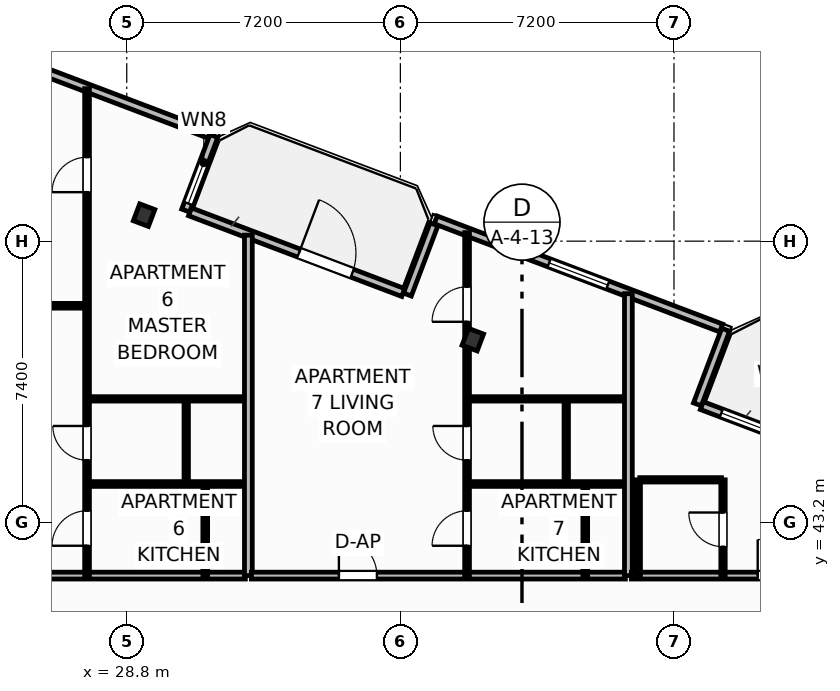
"""IFC4 building model, lengths in metres.
Left out: names, types, materials, properties, quantities, classifications, styles, units other than length and angle.
Written with IfcOpenShell. Run it as: python <this file> out.ifc"""

import sys

from ifc_helpers import new_model, si_unit, direction, frame, frame_2d, origin, origin_2d, place, context, subcontext, project, spatial, rectangle, i_section, extrude, element, fill, save


model = new_model("IFC4")
c1 = context("Model", 3, precision=1e-05, world=origin(), true_north=direction((0.0, 1.0)))
c2 = subcontext(c1, "Body", "Model", "MODEL_VIEW")
j1 = project(units=[si_unit("LENGTHUNIT", "METRE"), si_unit("PLANEANGLEUNIT", "RADIAN")], contexts=[c1])
p1 = place(None, origin())
s1 = spatial("IfcSite", under=j1, at=p1, CompositionType="ELEMENT")
p2 = place(p1, origin())
s2 = spatial("IfcBuilding", under=s1, at=p2, CompositionType="ELEMENT")
p3 = place(p2, frame((0.0, 0.0, 98.4)))
s3 = spatial("IfcBuildingStorey", under=s2, at=p3, CompositionType="ELEMENT", Elevation=98.4)
for number, where, z_axis, x_axis in (
    (1, (37.906, 48.009, 0.0), (0.0, 0.0, 1.0), (0.935, -0.354, 0.0)),
    (2, (29.256, 51.284, 0.0), (0.0, 0.0, 1.0), (0.935, -0.354, 0.0)),
):
    element("IfcColumn", number, at=place(p3, frame(where, z_axis=z_axis, x_axis=x_axis)), inside=s3, PredefinedType="COLUMN", context=c2, shape_type="SweptSolid", body=[
        extrude(i_section(OverallWidth=0.424, OverallDepth=0.474, WebThickness=0.048, FlangeThickness=0.077, FilletRadius=0.025, at=origin_2d()), origin(), (0.0, 0.0, 1.0), 3.7),
    ])
p4 = place(p3, frame((30.465, 51.372, 0.0), z_axis=(0.0, 0.0, 1.0), x_axis=(0.935227640088, -0.354046976001, 0.0)))
e3 = element("IfcWall", 3, at=p4, inside=s3, PredefinedType="SOLIDWALL", context=c2, shape_type="SweptSolid", body=[
    extrude(rectangle(XDim=6.0, YDim=0.22, at=frame_2d((3.0, 0.0))), origin(), (0.0, 0.0, 1.0), 2.73),
])
p5 = place(p4, frame((3.064, 0.0, 0.0)))
e4 = element("IfcOpeningElement", 4, at=p5, cuts=e3, PredefinedType="OPENING", context=c2, shape_type="SweptSolid", body=[
    extrude(rectangle(XDim=1.5, YDim=2.25, at=frame_2d((0.75, 1.125))), frame((0.0, 0.12, 0.0), z_axis=(0.0, -1.0, 0.0), x_axis=(1.0, 0.0, 0.0)), (0.0, 0.0, 1.0), 0.24),
])
p6 = place(p3, frame((43.932, 46.273, 0.0), z_axis=(0.0, 0.0, 1.0), x_axis=(0.93521416643, -0.354082565101, 0.0)))
e5 = element("IfcWall", 5, at=p6, inside=s3, PredefinedType="SOLIDWALL", context=c2, shape_type="SweptSolid", body=[
    extrude(rectangle(XDim=6.0, YDim=0.22, at=frame_2d((3.0, 0.0))), origin(), (0.0, 0.0, 1.0), 2.73),
])
p7 = place(p6, frame((3.508, 0.0, 0.0)))
e6 = element("IfcOpeningElement", 6, at=p7, cuts=e5, PredefinedType="OPENING", context=c2, shape_type="SweptSolid", body=[
    extrude(rectangle(XDim=1.5, YDim=2.25, at=frame_2d((0.75, 1.125))), frame((0.0, 0.12, 0.0), z_axis=(0.0, -1.0, 0.0), x_axis=(1.0, 0.0, 0.0)), (0.0, 0.0, 1.0), 0.24),
])
p8 = place(p6, frame((0.55, 0.0, 0.75)))
e7 = element("IfcOpeningElement", 7, at=p8, cuts=e5, PredefinedType="OPENING", context=c2, shape_type="SweptSolid", body=[
    extrude(rectangle(XDim=1.65, YDim=1.65, at=frame_2d((0.825, 0.825))), frame((0.0, 0.12, 0.0), z_axis=(0.0, -1.0, 0.0), x_axis=(1.0, 0.0, 0.0)), (0.0, 0.0, 1.0), 0.24),
])
p9 = place(p3, frame((43.817, 46.306, 0.0), z_axis=(0.0, 0.0, 1.0), x_axis=(0.353988291547, 0.935249854022, 0.0)))
e8 = element("IfcWall", 8, at=p9, inside=s3, PredefinedType="SOLIDWALL", context=c2, shape_type="SweptSolid", body=[
    extrude(rectangle(XDim=2.1, YDim=0.22, at=frame_2d((1.05, 0.0))), origin(), (0.0, 0.0, 1.0), 2.73),
])
p10 = place(p3, frame((44.443, 48.314, 0.0), z_axis=(0.0, 0.0, 1.0), x_axis=(-0.935226988293, 0.354048697735, 0.0)))
e9 = element("IfcWall", 9, at=p10, inside=s3, PredefinedType="SOLIDWALL", context=c2, shape_type="SweptSolid", body=[
    extrude(rectangle(XDim=8.035, YDim=0.22, at=frame_2d((4.018, 0.0))), origin(), (0.0, 0.0, 1.0), 2.73),
])
p11 = place(p10, frame((3.192, 0.0, 0.8)))
e10 = element("IfcOpeningElement", 10, at=p11, cuts=e9, PredefinedType="OPENING", context=c2, shape_type="SweptSolid", body=[
    extrude(rectangle(XDim=1.65, YDim=1.65, at=frame_2d((0.825, 0.825))), frame((0.0, 0.12, 0.0), z_axis=(0.0, -1.0, 0.0), x_axis=(1.0, 0.0, 0.0)), (0.0, 0.0, 1.0), 0.24),
])
p12 = place(p3, frame((36.885, 51.042, 0.0), z_axis=(0.0, 0.0, 1.0), x_axis=(-0.354128791944, -0.935196663123, 0.0)))
e11 = element("IfcWall", 11, at=p12, inside=s3, PredefinedType="SOLIDWALL", context=c2, shape_type="SweptSolid", body=[
    extrude(rectangle(XDim=1.975, YDim=0.22, at=frame_2d((0.988, 0.0))), origin(), (0.0, 0.0, 1.0), 2.73),
])
p13 = place(p3, frame((30.349, 51.405, 0.0), z_axis=(0.0, 0.0, 1.0), x_axis=(0.354128469405, 0.935196785258, 0.0)))
e12 = element("IfcWall", 12, at=p13, inside=s3, PredefinedType="SOLIDWALL", context=c2, shape_type="SweptSolid", body=[
    extrude(rectangle(XDim=2.1, YDim=0.22, at=frame_2d((1.05, 0.0))), origin(), (0.0, 0.0, 1.0), 2.73),
])
p14 = place(p13, frame((0.2, 0.0, 0.8)))
e13 = element("IfcOpeningElement", 13, at=p14, cuts=e12, PredefinedType="OPENING", context=c2, shape_type="SweptSolid", body=[
    extrude(rectangle(XDim=1.15, YDim=1.4, at=frame_2d((0.575, 0.7))), frame((0.0, 0.12, 0.0), z_axis=(0.0, -1.0, 0.0), x_axis=(1.0, 0.0, 0.0)), (0.0, 0.0, 1.0), 0.24),
])
p15 = place(p3, frame((30.976, 53.413, 0.0), z_axis=(0.0, 0.0, 1.0), x_axis=(-0.935220327379, 0.354066292178, 0.0)))
e14 = element("IfcWall", 14, at=p15, inside=s3, PredefinedType="SOLIDWALL", context=c2, shape_type="SweptSolid", body=[
    extrude(rectangle(XDim=14.347, YDim=0.22, at=frame_2d((7.174, 0.0))), origin(), (0.0, 0.0, 1.0), 2.73),
])
p16 = place(p15, frame((6.348, 0.0, 0.8)))
e15 = element("IfcOpeningElement", 15, at=p16, cuts=e14, PredefinedType="OPENING", context=c2, shape_type="SweptSolid", body=[
    extrude(rectangle(XDim=1.65, YDim=1.65, at=frame_2d((0.825, 0.825))), frame((0.0, 0.12, 0.0), z_axis=(0.0, -1.0, 0.0), x_axis=(1.0, 0.0, 0.0)), (0.0, 0.0, 1.0), 0.24),
])
p17 = place(p3, frame((22.08, 48.9, 0.0), z_axis=(0.0, 0.0, 1.0), x_axis=(1.0, 0.0, 0.0)))
e16 = element("IfcWall", 16, at=p17, inside=s3, PredefinedType="PARTITIONING", context=c2, shape_type="SweptSolid", body=[
    extrude(rectangle(XDim=5.605, YDim=0.125, at=frame_2d((2.803, 0.0))), origin(), (0.0, 0.0, 1.0), 3.45),
])
p18 = place(p17, frame((2.522, 0.0, 0.0)))
e17 = element("IfcOpeningElement", 17, at=p18, cuts=e16, PredefinedType="OPENING", context=c2, shape_type="SweptSolid", body=[
    extrude(rectangle(XDim=0.92, YDim=2.05, at=frame_2d((0.46, 1.025))), frame((0.0, 0.073, 0.0), z_axis=(0.0, -1.0, 0.0), x_axis=(1.0, 0.0, 0.0)), (0.0, 0.0, 1.0), 0.145),
])
p19 = place(p3, frame((22.08, 41.8, 0.0), z_axis=(0.0, 0.0, 1.0), x_axis=(1.0, 0.0, 0.0)))
e18 = element("IfcWall", 18, at=p19, inside=s3, PredefinedType="PARTITIONING", context=c2, shape_type="SweptSolid", body=[
    extrude(rectangle(XDim=9.84, YDim=0.18, at=frame_2d((4.92, 0.0))), origin(), (0.0, 0.0, 1.0), 3.45),
])
p20 = place(p19, frame((2.302, 0.0, 0.0)))
e19 = element("IfcOpeningElement", 19, at=p20, cuts=e18, PredefinedType="OPENING", context=c2, shape_type="SweptSolid", body=[
    extrude(rectangle(XDim=1.0, YDim=2.2, at=frame_2d((0.5, 1.1))), frame((0.0, 0.1, 0.0), z_axis=(0.0, -1.0, 0.0), x_axis=(1.0, 0.0, 0.0)), (0.0, 0.0, 1.0), 0.2),
])
p21 = place(p3, frame((27.755, 41.8, 0.0), z_axis=(0.0, 0.0, 1.0), x_axis=(0.0, 1.0, 0.0)))
e20 = element("IfcWall", 20, at=p21, inside=s3, PredefinedType="PARTITIONING", context=c2, shape_type="SweptSolid", body=[
    extrude(rectangle(XDim=12.811, YDim=0.125, at=frame_2d((6.405, 0.0))), origin(), (0.0, 0.0, 1.0), 3.45),
])
p22 = place(p21, frame((0.785, 0.0, 0.0)))
e21 = element("IfcOpeningElement", 21, at=p22, cuts=e20, PredefinedType="OPENING", context=c2, shape_type="SweptSolid", body=[
    extrude(rectangle(XDim=0.92, YDim=2.05, at=frame_2d((0.46, 1.025))), frame((0.0, 0.073, 0.0), z_axis=(0.0, -1.0, 0.0), x_axis=(1.0, 0.0, 0.0)), (0.0, 0.0, 1.0), 0.145),
])
p23 = place(p21, frame((3.037, 0.0, 0.0)))
e22 = element("IfcOpeningElement", 22, at=p23, cuts=e20, PredefinedType="OPENING", context=c2, shape_type="SweptSolid", body=[
    extrude(rectangle(XDim=0.9, YDim=2.05, at=frame_2d((0.45, 1.025))), frame((0.0, 0.073, 0.0), z_axis=(0.0, -1.0, 0.0), x_axis=(1.0, 0.0, 0.0)), (0.0, 0.0, 1.0), 0.145),
])
p24 = place(p21, frame((10.089, 0.0, 0.0)))
e23 = element("IfcOpeningElement", 23, at=p24, cuts=e20, PredefinedType="OPENING", context=c2, shape_type="SweptSolid", body=[
    extrude(rectangle(XDim=0.92, YDim=2.05, at=frame_2d((0.46, 1.025))), frame((0.0, 0.073, 0.0), z_axis=(0.0, -1.0, 0.0), x_axis=(1.0, 0.0, 0.0)), (0.0, 0.0, 1.0), 0.145),
])
p25 = place(p3, frame((27.825, 44.21, 0.0), z_axis=(0.0, 0.0, 1.0), x_axis=(1.0, 0.0, 0.0)))
e24 = element("IfcWall", 24, at=p25, inside=s3, PredefinedType="PARTITIONING", context=c2, shape_type="SweptSolid", body=[
    extrude(rectangle(XDim=4.095, YDim=0.125, at=frame_2d((2.047, 0.0))), origin(), (0.0, 0.0, 1.0), 3.45),
])
p26 = place(p3, frame((27.825, 46.45, 0.0), z_axis=(0.0, 0.0, 1.0), x_axis=(1.0, 0.0, 0.0)))
e25 = element("IfcWall", 25, at=p26, inside=s3, PredefinedType="PARTITIONING", context=c2, shape_type="SweptSolid", body=[
    extrude(rectangle(XDim=4.095, YDim=0.115, at=frame_2d((2.047, 0.0))), origin(), (0.0, 0.0, 1.0), 3.45),
])
p27 = place(p3, frame((30.865, 41.8, 0.0), z_axis=(0.0, 0.0, 1.0), x_axis=(0.0, 1.0, 0.0)))
e26 = element("IfcWall", 26, at=p27, inside=s3, PredefinedType="PARTITIONING", context=c2, shape_type="SweptSolid", body=[
    extrude(rectangle(XDim=2.41, YDim=0.125, at=frame_2d((1.205, 0.0))), origin(), (0.0, 0.0, 1.0), 3.45),
])
p28 = place(p3, frame((30.365, 44.21, 0.0), z_axis=(0.0, 0.0, 1.0), x_axis=(0.0, 1.0, 0.0)))
e27 = element("IfcWall", 27, at=p28, inside=s3, PredefinedType="PARTITIONING", context=c2, shape_type="SweptSolid", body=[
    extrude(rectangle(XDim=2.24, YDim=0.115, at=frame_2d((1.12, 0.0))), origin(), (0.0, 0.0, 1.0), 3.45),
])
p29 = place(p3, frame((32.0, 41.8, 0.0), z_axis=(0.0, 0.0, 1.0), x_axis=(0.0, 1.0, 0.0)))
e28 = element("IfcWall", 28, at=p29, inside=s3, PredefinedType="PARTITIONING", context=c2, shape_type="SweptSolid", body=[
    extrude(rectangle(XDim=8.958, YDim=0.205, at=frame_2d((4.479, 0.0))), origin(), (0.0, 0.0, 1.0), 3.45),
])
p30 = place(p3, frame((32.08, 41.8, 0.0), z_axis=(0.0, 0.0, 1.0), x_axis=(1.0, 0.0, 0.0)))
e29 = element("IfcWall", 29, at=p30, inside=s3, PredefinedType="PARTITIONING", context=c2, shape_type="SweptSolid", body=[
    extrude(rectangle(XDim=9.84, YDim=0.18, at=frame_2d((4.92, 0.0))), origin(), (0.0, 0.0, 1.0), 3.45),
])
p31 = place(p30, frame((2.302, 0.0, 0.0)))
e30 = element("IfcOpeningElement", 30, at=p31, cuts=e29, PredefinedType="OPENING", context=c2, shape_type="SweptSolid", body=[
    extrude(rectangle(XDim=1.0, YDim=2.2, at=frame_2d((0.5, 1.1))), frame((0.0, 0.1, 0.0), z_axis=(0.0, -1.0, 0.0), x_axis=(1.0, 0.0, 0.0)), (0.0, 0.0, 1.0), 0.2),
])
p32 = place(p3, frame((37.755, 41.8, 0.0), z_axis=(0.0, 0.0, 1.0), x_axis=(0.0, 1.0, 0.0)))
e31 = element("IfcWall", 31, at=p32, inside=s3, PredefinedType="PARTITIONING", context=c2, shape_type="SweptSolid", body=[
    extrude(rectangle(XDim=9.025, YDim=0.125, at=frame_2d((4.512, 0.0))), origin(), (0.0, 0.0, 1.0), 3.45),
])
p33 = place(p32, frame((0.785, 0.0, 0.0)))
e32 = element("IfcOpeningElement", 32, at=p33, cuts=e31, PredefinedType="OPENING", context=c2, shape_type="SweptSolid", body=[
    extrude(rectangle(XDim=0.92, YDim=2.05, at=frame_2d((0.46, 1.025))), frame((0.0, 0.073, 0.0), z_axis=(0.0, -1.0, 0.0), x_axis=(1.0, 0.0, 0.0)), (0.0, 0.0, 1.0), 0.145),
])
p34 = place(p32, frame((3.037, 0.0, 0.0)))
e33 = element("IfcOpeningElement", 33, at=p34, cuts=e31, PredefinedType="OPENING", context=c2, shape_type="SweptSolid", body=[
    extrude(rectangle(XDim=0.9, YDim=2.05, at=frame_2d((0.45, 1.025))), frame((0.0, 0.073, 0.0), z_axis=(0.0, -1.0, 0.0), x_axis=(1.0, 0.0, 0.0)), (0.0, 0.0, 1.0), 0.145),
])
p35 = place(p32, frame((6.678, 0.0, 0.0)))
e34 = element("IfcOpeningElement", 34, at=p35, cuts=e31, PredefinedType="OPENING", context=c2, shape_type="SweptSolid", body=[
    extrude(rectangle(XDim=0.92, YDim=2.05, at=frame_2d((0.46, 1.025))), frame((0.0, 0.073, 0.0), z_axis=(0.0, -1.0, 0.0), x_axis=(1.0, 0.0, 0.0)), (0.0, 0.0, 1.0), 0.145),
])
p36 = place(p3, frame((37.825, 44.21, 0.0), z_axis=(0.0, 0.0, 1.0), x_axis=(1.0, 0.0, 0.0)))
e35 = element("IfcWall", 35, at=p36, inside=s3, PredefinedType="PARTITIONING", context=c2, shape_type="SweptSolid", body=[
    extrude(rectangle(XDim=4.095, YDim=0.125, at=frame_2d((2.047, 0.0))), origin(), (0.0, 0.0, 1.0), 2.972),
])
p37 = place(p3, frame((37.825, 46.45, 0.0), z_axis=(0.0, 0.0, 1.0), x_axis=(1.0, 0.0, 0.0)))
e36 = element("IfcWall", 36, at=p37, inside=s3, PredefinedType="PARTITIONING", context=c2, shape_type="SweptSolid", body=[
    extrude(rectangle(XDim=4.095, YDim=0.115, at=frame_2d((2.047, 0.0))), origin(), (0.0, 0.0, 1.0), 3.45),
])
p38 = place(p3, frame((40.865, 41.8, 0.0), z_axis=(0.0, 0.0, 1.0), x_axis=(0.0, 1.0, 0.0)))
e37 = element("IfcWall", 37, at=p38, inside=s3, PredefinedType="PARTITIONING", context=c2, shape_type="SweptSolid", body=[
    extrude(rectangle(XDim=2.41, YDim=0.125, at=frame_2d((1.205, 0.0))), origin(), (0.0, 0.0, 1.0), 3.45),
])
p39 = place(p3, frame((40.365, 44.21, 0.0), z_axis=(0.0, 0.0, 1.0), x_axis=(0.0, 1.0, 0.0)))
e38 = element("IfcWall", 38, at=p39, inside=s3, PredefinedType="PARTITIONING", context=c2, shape_type="SweptSolid", body=[
    extrude(rectangle(XDim=2.24, YDim=0.115, at=frame_2d((1.12, 0.0))), origin(), (0.0, 0.0, 1.0), 3.45),
])
p40 = place(p3, frame((42.0, 41.8, 0.0), z_axis=(0.0, 0.0, 1.0), x_axis=(0.0, 1.0, 0.0)))
e39 = element("IfcWall", 39, at=p40, inside=s3, PredefinedType="PARTITIONING", context=c2, shape_type="SweptSolid", body=[
    extrude(rectangle(XDim=7.418, YDim=0.205, at=frame_2d((3.709, 0.0))), origin(), (0.0, 0.0, 1.0), 3.45),
])
p41 = place(p3, frame((42.08, 41.8, 0.0), z_axis=(0.0, 0.0, 1.0), x_axis=(1.0, 0.0, 0.0)))
e40 = element("IfcWall", 40, at=p41, inside=s3, PredefinedType="PARTITIONING", context=c2, shape_type="SweptSolid", body=[
    extrude(rectangle(XDim=9.84, YDim=0.18, at=frame_2d((4.92, 0.0))), origin(), (0.0, 0.0, 1.0), 3.45),
])
p42 = place(p41, frame((3.323, 0.0, 0.0)))
e41 = element("IfcOpeningElement", 41, at=p42, cuts=e40, PredefinedType="OPENING", context=c2, shape_type="SweptSolid", body=[
    extrude(rectangle(XDim=0.95, YDim=2.15, at=frame_2d((0.475, 1.075))), frame((0.0, 0.1, 0.0), z_axis=(0.0, -1.0, 0.0), x_axis=(1.0, 0.0, 0.0)), (0.0, 0.0, 1.0), 0.2),
])
p43 = place(p3, frame((42.3, 44.32, 0.0), z_axis=(0.0, 0.0, 1.0), x_axis=(1.0, 0.0, 0.0)))
e42 = element("IfcWall", 42, at=p43, inside=s3, PredefinedType="PARTITIONING", context=c2, shape_type="SweptSolid", body=[
    extrude(rectangle(XDim=2.15, YDim=0.115, at=frame_2d((1.075, 0.0))), origin(), (0.0, 0.0, 1.0), 3.45),
])
p44 = place(p3, frame((44.49, 41.8, 0.0), z_axis=(0.0, 0.0, 1.0), x_axis=(0.0, 1.0, 0.0)))
e43 = element("IfcWall", 43, at=p44, inside=s3, PredefinedType="PARTITIONING", context=c2, shape_type="SweptSolid", body=[
    extrude(rectangle(XDim=2.52, YDim=0.115, at=frame_2d((1.26, 0.0))), origin(), (0.0, 0.0, 1.0), 3.45),
])
p45 = place(p44, frame((0.76, 0.0, 0.0)))
e44 = element("IfcOpeningElement", 44, at=p45, cuts=e43, PredefinedType="OPENING", context=c2, shape_type="SweptSolid", body=[
    extrude(rectangle(XDim=0.9, YDim=2.05, at=frame_2d((0.45, 1.025))), frame((0.0, 0.067, 0.0), z_axis=(0.0, -1.0, 0.0), x_axis=(1.0, 0.0, 0.0)), (0.0, 0.0, 1.0), 0.135),
])
p46 = place(p3, frame((42.26, 41.8, 0.0), z_axis=(0.0, 0.0, 1.0), x_axis=(0.0, 1.0, 0.0)))
e45 = element("IfcWall", 45, at=p46, inside=s3, PredefinedType="PARTITIONING", context=c2, shape_type="SweptSolid", body=[
    extrude(rectangle(XDim=2.52, YDim=0.115, at=frame_2d((1.26, 0.0))), origin(), (0.0, 0.0, 1.0), 3.45),
])
p47 = place(p5, origin())
e46 = element("IfcDoor", 46, at=p47, inside=s3, OperationType="SINGLE_SWING_LEFT", PredefinedType="DOOR", context=c2, shape_type="SweptSolid", body=[
    extrude(rectangle(XDim=1.5, YDim=2.25, at=frame_2d((0.75, 1.125))), frame((0.0, 0.025, 0.0), z_axis=(0.0, -1.0, 0.0), x_axis=(1.0, 0.0, 0.0)), (0.0, 0.0, 1.0), 0.05),
])
fill(e4, e46)
p48 = place(p8, origin())
e47 = element("IfcWindow", 47, at=p48, inside=s3, PartitioningType="SINGLE_PANEL", PredefinedType="WINDOW", context=c2, shape_type="SweptSolid", body=[
    extrude(rectangle(XDim=1.65, YDim=1.65, at=frame_2d((0.825, 0.825))), frame((0.0, 0.03, 0.0), z_axis=(0.0, -1.0, 0.0), x_axis=(1.0, 0.0, 0.0)), (0.0, 0.0, 1.0), 0.06),
])
fill(e7, e47)
p49 = place(p11, origin())
e48 = element("IfcWindow", 48, at=p49, inside=s3, PartitioningType="SINGLE_PANEL", PredefinedType="WINDOW", context=c2, shape_type="SweptSolid", body=[
    extrude(rectangle(XDim=1.65, YDim=1.65, at=frame_2d((0.825, 0.825))), frame((0.0, 0.03, 0.0), z_axis=(0.0, -1.0, 0.0), x_axis=(1.0, 0.0, 0.0)), (0.0, 0.0, 1.0), 0.06),
])
fill(e10, e48)
p50 = place(p22, origin())
e49 = element("IfcDoor", 49, at=p50, inside=s3, OperationType="SINGLE_SWING_LEFT", PredefinedType="DOOR", context=c2, shape_type="SweptSolid", body=[
    extrude(rectangle(XDim=0.92, YDim=2.05, at=frame_2d((0.46, 1.025))), frame((0.0, 0.025, 0.0), z_axis=(0.0, -1.0, 0.0), x_axis=(1.0, 0.0, 0.0)), (0.0, 0.0, 1.0), 0.05),
])
fill(e21, e49)
p51 = place(p23, origin())
e50 = element("IfcDoor", 50, at=p51, inside=s3, OperationType="SINGLE_SWING_RIGHT", PredefinedType="DOOR", context=c2, shape_type="SweptSolid", body=[
    extrude(rectangle(XDim=0.9, YDim=2.05, at=frame_2d((0.45, 1.025))), frame((0.0, 0.025, 0.0), z_axis=(0.0, -1.0, 0.0), x_axis=(1.0, 0.0, 0.0)), (0.0, 0.0, 1.0), 0.05),
])
fill(e22, e50)
p52 = place(p24, origin())
e51 = element("IfcDoor", 51, at=p52, inside=s3, OperationType="SINGLE_SWING_LEFT", PredefinedType="DOOR", context=c2, shape_type="SweptSolid", body=[
    extrude(rectangle(XDim=0.92, YDim=2.05, at=frame_2d((0.46, 1.025))), frame((0.0, 0.025, 0.0), z_axis=(0.0, -1.0, 0.0), x_axis=(1.0, 0.0, 0.0)), (0.0, 0.0, 1.0), 0.05),
])
fill(e23, e51)
p53 = place(p31, origin())
e52 = element("IfcDoor", 52, at=p53, inside=s3, OperationType="SINGLE_SWING_LEFT", PredefinedType="DOOR", context=c2, shape_type="SweptSolid", body=[
    extrude(rectangle(XDim=1.0, YDim=2.2, at=frame_2d((0.5, 1.1))), frame((0.0, 0.025, 0.0), z_axis=(0.0, -1.0, 0.0), x_axis=(1.0, 0.0, 0.0)), (0.0, 0.0, 1.0), 0.05),
])
fill(e30, e52)
p54 = place(p33, origin())
e53 = element("IfcDoor", 53, at=p54, inside=s3, OperationType="SINGLE_SWING_LEFT", PredefinedType="DOOR", context=c2, shape_type="SweptSolid", body=[
    extrude(rectangle(XDim=0.92, YDim=2.05, at=frame_2d((0.46, 1.025))), frame((0.0, 0.025, 0.0), z_axis=(0.0, -1.0, 0.0), x_axis=(1.0, 0.0, 0.0)), (0.0, 0.0, 1.0), 0.05),
])
fill(e32, e53)
p55 = place(p34, origin())
e54 = element("IfcDoor", 54, at=p55, inside=s3, OperationType="SINGLE_SWING_RIGHT", PredefinedType="DOOR", context=c2, shape_type="SweptSolid", body=[
    extrude(rectangle(XDim=0.9, YDim=2.05, at=frame_2d((0.45, 1.025))), frame((0.0, 0.025, 0.0), z_axis=(0.0, -1.0, 0.0), x_axis=(1.0, 0.0, 0.0)), (0.0, 0.0, 1.0), 0.05),
])
fill(e33, e54)
p56 = place(p35, origin())
e55 = element("IfcDoor", 55, at=p56, inside=s3, OperationType="SINGLE_SWING_LEFT", PredefinedType="DOOR", context=c2, shape_type="SweptSolid", body=[
    extrude(rectangle(XDim=0.92, YDim=2.05, at=frame_2d((0.46, 1.025))), frame((0.0, 0.025, 0.0), z_axis=(0.0, -1.0, 0.0), x_axis=(1.0, 0.0, 0.0)), (0.0, 0.0, 1.0), 0.05),
])
fill(e34, e55)
p57 = place(p42, origin())
e56 = element("IfcDoor", 56, at=p57, inside=s3, OperationType="SINGLE_SWING_LEFT", PredefinedType="DOOR", context=c2, shape_type="SweptSolid", body=[
    extrude(rectangle(XDim=0.95, YDim=2.15, at=frame_2d((0.475, 1.075))), frame((0.0, 0.025, 0.0), z_axis=(0.0, -1.0, 0.0), x_axis=(1.0, 0.0, 0.0)), (0.0, 0.0, 1.0), 0.05),
])
fill(e41, e56)
p58 = place(p45, origin())
e57 = element("IfcDoor", 57, at=p58, inside=s3, OperationType="SINGLE_SWING_RIGHT", PredefinedType="DOOR", context=c2, shape_type="SweptSolid", body=[
    extrude(rectangle(XDim=0.9, YDim=2.05, at=frame_2d((0.45, 1.025))), frame((0.0, 0.025, 0.0), z_axis=(0.0, -1.0, 0.0), x_axis=(1.0, 0.0, 0.0)), (0.0, 0.0, 1.0), 0.05),
])
fill(e44, e57)
p59 = place(p14, origin())
e58 = element("IfcWindow", 58, at=p59, inside=s3, PartitioningType="SINGLE_PANEL", PredefinedType="WINDOW", context=c2, shape_type="SweptSolid", body=[
    extrude(rectangle(XDim=1.15, YDim=1.4, at=frame_2d((0.575, 0.7))), frame((0.0, 0.03, 0.0), z_axis=(0.0, -1.0, 0.0), x_axis=(1.0, 0.0, 0.0)), (0.0, 0.0, 1.0), 0.06),
])
fill(e13, e58)
save(model, sys.argv[1])
